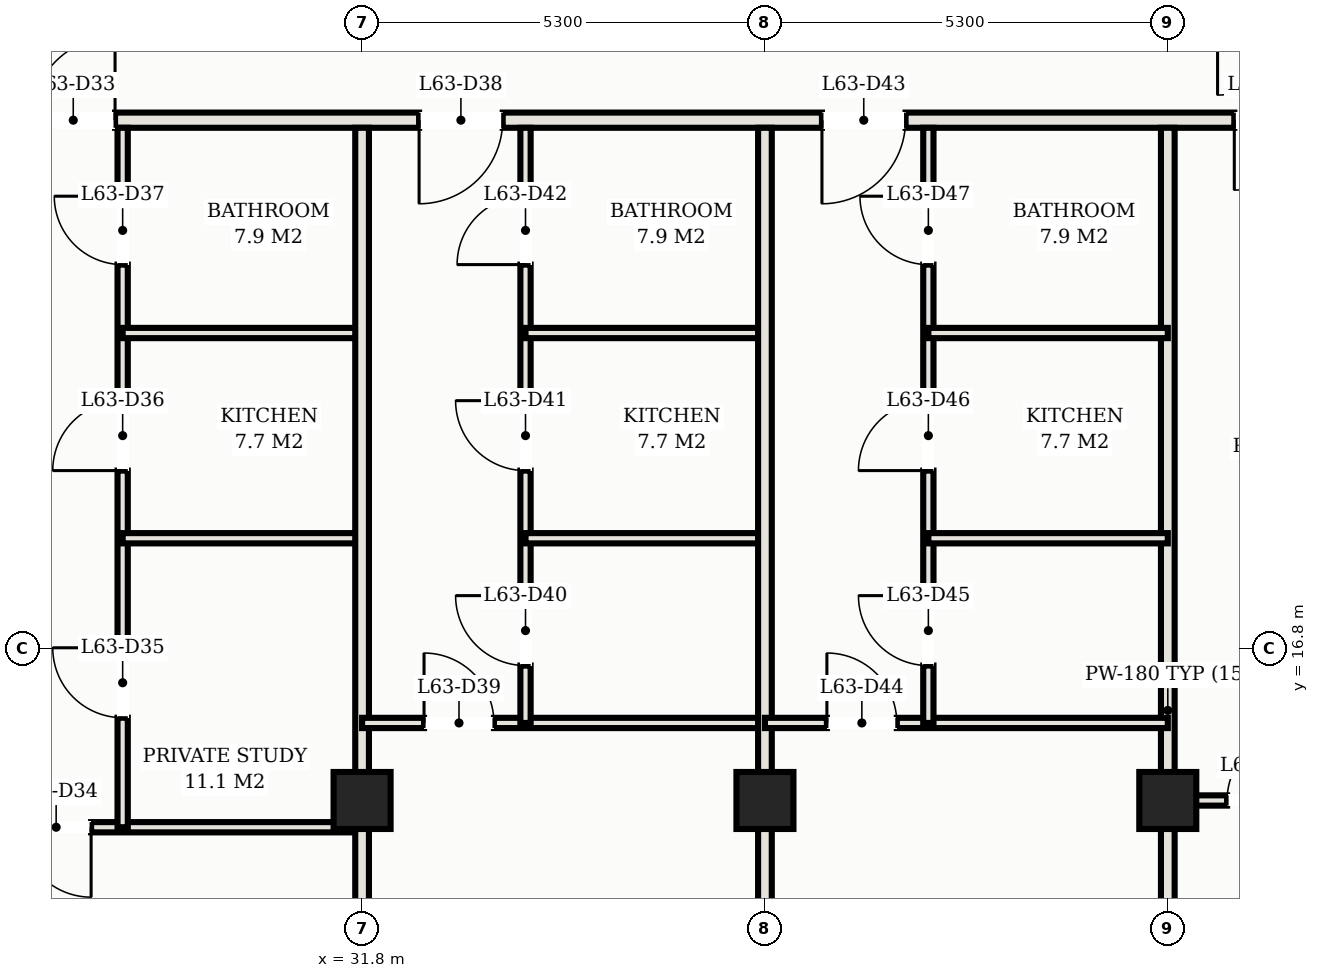
"""IFC4 building model, lengths in metres.
Left out: names, types, materials, properties, quantities, classifications, styles, units other than length and angle.
Written with IfcOpenShell. Run it as: python <this file> out.ifc"""

import sys

from ifc_helpers import new_model, si_unit, direction, frame, frame_2d, origin, origin_2d, place, context, subcontext, project, spatial, rectangle, hollow_rectangle, extrude, element, fill, save


model = new_model("IFC4")
c1 = context("Model", 3, precision=1e-05, world=origin(), true_north=direction((0.0, 1.0)))
c2 = subcontext(c1, "Body", "Model", "MODEL_VIEW")
j1 = project(units=[si_unit("LENGTHUNIT", "METRE"), si_unit("PLANEANGLEUNIT", "RADIAN")], contexts=[c1])
p1 = place(None, origin())
s1 = spatial("IfcSite", under=j1, at=p1, CompositionType="ELEMENT")
p2 = place(p1, origin())
s2 = spatial("IfcBuilding", under=s1, at=p2, CompositionType="ELEMENT")
p3 = place(p2, frame((0.0, 0.0, 229.7)))
s3 = spatial("IfcBuildingStorey", under=s2, at=p3, CompositionType="ELEMENT", Elevation=229.7)
for number, where, z_axis, x_axis in (
    (1, (31.8, 14.8, 0.0), (0.0, 0.0, 1.0), (1.0, 0.0, 0.0)),
    (2, (37.1, 14.8, 0.0), (0.0, 0.0, 1.0), (1.0, 0.0, 0.0)),
    (3, (42.4, 14.8, 0.0), (0.0, 0.0, 1.0), (1.0, 0.0, 0.0)),
):
    element("IfcColumn", number, at=place(p3, frame(where, z_axis=z_axis, x_axis=x_axis)), inside=s3, PredefinedType="COLUMN", context=c2, shape_type="SweptSolid", body=[
        extrude(hollow_rectangle(XDim=0.75, YDim=0.75, WallThickness=0.025, at=origin_2d()), origin(), (0.0, 0.0, 1.0), 3.3),
    ])
p4 = place(p3, frame((6.72, 23.75, 0.0), z_axis=(0.0, 0.0, 1.0), x_axis=(1.0, 0.0, 0.0)))
e4 = element("IfcWall", 4, at=p4, inside=s3, PredefinedType="PARTITIONING", context=c2, shape_type="SweptSolid", body=[
    extrude(rectangle(XDim=39.56, YDim=0.2, at=frame_2d((19.78, 0.0))), origin(), (0.0, 0.0, 1.0), 2.43),
])
p5 = place(p4, frame((4.63, 0.0, 0.0)))
e5 = element("IfcOpeningElement", 5, at=p5, cuts=e4, PredefinedType="OPENING", context=c2, shape_type="SweptSolid", body=[
    extrude(rectangle(XDim=1.1, YDim=2.25, at=frame_2d((0.55, 1.125))), frame((0.0, 0.11, 0.0), z_axis=(0.0, -1.0, 0.0), x_axis=(1.0, 0.0, 0.0)), (0.0, 0.0, 1.0), 0.22),
])
p6 = place(p4, frame((9.93, 0.0, 0.0)))
e6 = element("IfcOpeningElement", 6, at=p6, cuts=e4, PredefinedType="OPENING", context=c2, shape_type="SweptSolid", body=[
    extrude(rectangle(XDim=1.1, YDim=2.25, at=frame_2d((0.55, 1.125))), frame((0.0, 0.11, 0.0), z_axis=(0.0, -1.0, 0.0), x_axis=(1.0, 0.0, 0.0)), (0.0, 0.0, 1.0), 0.22),
])
p7 = place(p4, frame((15.23, 0.0, 0.0)))
e7 = element("IfcOpeningElement", 7, at=p7, cuts=e4, PredefinedType="OPENING", context=c2, shape_type="SweptSolid", body=[
    extrude(rectangle(XDim=1.1, YDim=2.25, at=frame_2d((0.55, 1.125))), frame((0.0, 0.11, 0.0), z_axis=(0.0, -1.0, 0.0), x_axis=(1.0, 0.0, 0.0)), (0.0, 0.0, 1.0), 0.22),
])
p8 = place(p4, frame((20.73, 0.0, 0.0)))
e8 = element("IfcOpeningElement", 8, at=p8, cuts=e4, PredefinedType="OPENING", context=c2, shape_type="SweptSolid", body=[
    extrude(rectangle(XDim=1.1, YDim=2.25, at=frame_2d((0.55, 1.125))), frame((0.0, 0.11, 0.0), z_axis=(0.0, -1.0, 0.0), x_axis=(1.0, 0.0, 0.0)), (0.0, 0.0, 1.0), 0.22),
])
p9 = place(p4, frame((25.83, 0.0, 0.0)))
e9 = element("IfcOpeningElement", 9, at=p9, cuts=e4, PredefinedType="OPENING", context=c2, shape_type="SweptSolid", body=[
    extrude(rectangle(XDim=1.1, YDim=2.25, at=frame_2d((0.55, 1.125))), frame((0.0, 0.11, 0.0), z_axis=(0.0, -1.0, 0.0), x_axis=(1.0, 0.0, 0.0)), (0.0, 0.0, 1.0), 0.22),
])
p10 = place(p4, frame((31.13, 0.0, 0.0)))
e10 = element("IfcOpeningElement", 10, at=p10, cuts=e4, PredefinedType="OPENING", context=c2, shape_type="SweptSolid", body=[
    extrude(rectangle(XDim=1.1, YDim=2.25, at=frame_2d((0.55, 1.125))), frame((0.0, 0.11, 0.0), z_axis=(0.0, -1.0, 0.0), x_axis=(1.0, 0.0, 0.0)), (0.0, 0.0, 1.0), 0.22),
])
p11 = place(p4, frame((2.085, 0.0, 0.0)))
e11 = element("IfcOpeningElement", 11, at=p11, cuts=e4, PredefinedType="OPENING", context=c2, shape_type="SweptSolid", body=[
    extrude(rectangle(XDim=0.92, YDim=2.15, at=frame_2d((0.46, 1.075))), frame((0.0, 0.11, 0.0), z_axis=(0.0, -1.0, 0.0), x_axis=(1.0, 0.0, 0.0)), (0.0, 0.0, 1.0), 0.22),
])
p12 = place(p4, frame((36.555, 0.0, 0.0)))
e12 = element("IfcOpeningElement", 12, at=p12, cuts=e4, PredefinedType="OPENING", context=c2, shape_type="SweptSolid", body=[
    extrude(rectangle(XDim=0.92, YDim=2.15, at=frame_2d((0.46, 1.075))), frame((0.0, 0.11, 0.0), z_axis=(0.0, -1.0, 0.0), x_axis=(1.0, 0.0, 0.0)), (0.0, 0.0, 1.0), 0.22),
])
p13 = place(p3, frame((42.4, 8.32, 0.0), z_axis=(0.0, 0.0, 1.0), x_axis=(0.0, 1.0, 0.0)))
e13 = element("IfcWall", 13, at=p13, inside=s3, PredefinedType="PARTITIONING", context=c2, shape_type="SweptSolid", body=[
    extrude(rectangle(XDim=15.33, YDim=0.18, at=frame_2d((7.665, 0.0))), origin(), (0.0, 0.0, 1.0), 2.43),
])
p14 = place(p3, frame((26.5, 14.448, 0.0), z_axis=(0.0, 0.0, 1.0), x_axis=(1.0, 0.0, 0.0)))
e14 = element("IfcWall", 14, at=p14, inside=s3, PredefinedType="PARTITIONING", context=c2, shape_type="SweptSolid", body=[
    extrude(rectangle(XDim=5.3, YDim=0.135, at=frame_2d((2.65, 0.0))), origin(), (0.0, 0.0, 1.0), 2.43),
])
p15 = place(p14, frame((0.815, 0.0, 0.0)))
e15 = element("IfcOpeningElement", 15, at=p15, cuts=e14, PredefinedType="OPENING", context=c2, shape_type="SweptSolid", body=[
    extrude(rectangle(XDim=0.92, YDim=2.15, at=frame_2d((0.46, 1.075))), frame((0.0, 0.078, 0.0), z_axis=(0.0, -1.0, 0.0), x_axis=(1.0, 0.0, 0.0)), (0.0, 0.0, 1.0), 0.155),
])
p16 = place(p3, frame((28.65, 14.448, 0.0), z_axis=(0.0, 0.0, 1.0), x_axis=(0.0, 1.0, 0.0)))
e16 = element("IfcWall", 16, at=p16, inside=s3, PredefinedType="PARTITIONING", context=c2, shape_type="SweptSolid", body=[
    extrude(rectangle(XDim=9.202, YDim=0.135, at=frame_2d((4.601, 0.0))), origin(), (0.0, 0.0, 1.0), 2.43),
])
p17 = place(p16, frame((1.441, 0.0, 0.0)))
e17 = element("IfcOpeningElement", 17, at=p17, cuts=e16, PredefinedType="OPENING", context=c2, shape_type="SweptSolid", body=[
    extrude(rectangle(XDim=0.92, YDim=2.15, at=frame_2d((0.46, 1.075))), frame((0.0, 0.078, 0.0), z_axis=(0.0, -1.0, 0.0), x_axis=(1.0, 0.0, 0.0)), (0.0, 0.0, 1.0), 0.155),
])
p18 = place(p16, frame((4.692, 0.0, 0.0)))
e18 = element("IfcOpeningElement", 18, at=p18, cuts=e16, PredefinedType="OPENING", context=c2, shape_type="SweptSolid", body=[
    extrude(rectangle(XDim=0.92, YDim=2.15, at=frame_2d((0.46, 1.075))), frame((0.0, 0.078, 0.0), z_axis=(0.0, -1.0, 0.0), x_axis=(1.0, 0.0, 0.0)), (0.0, 0.0, 1.0), 0.155),
])
p19 = place(p16, frame((7.402, 0.0, 0.0)))
e19 = element("IfcOpeningElement", 19, at=p19, cuts=e16, PredefinedType="OPENING", context=c2, shape_type="SweptSolid", body=[
    extrude(rectangle(XDim=0.9, YDim=2.15, at=frame_2d((0.45, 1.075))), frame((0.0, 0.078, 0.0), z_axis=(0.0, -1.0, 0.0), x_axis=(1.0, 0.0, 0.0)), (0.0, 0.0, 1.0), 0.155),
])
for number, where, z_axis, x_axis in (
    (20, (28.65, 18.25, 0.0), (0.0, 0.0, 1.0), (1.0, 0.0, 0.0)),
    (21, (28.65, 20.95, 0.0), (0.0, 0.0, 1.0), (1.0, 0.0, 0.0)),
):
    element("IfcWall", number, at=place(p3, frame(where, z_axis=z_axis, x_axis=x_axis)), inside=s3, PredefinedType="PARTITIONING", context=c2, shape_type="SweptSolid", body=[
        extrude(rectangle(XDim=3.15, YDim=0.135, at=frame_2d((1.575, 0.0))), origin(), (0.0, 0.0, 1.0), 2.43),
    ])
p20 = place(p3, frame((31.8, 5.331, 0.0), z_axis=(0.0, 0.0, 1.0), x_axis=(0.0, 1.0, 0.0)))
e22 = element("IfcWall", 22, at=p20, inside=s3, PredefinedType="PARTITIONING", context=c2, shape_type="SweptSolid", body=[
    extrude(rectangle(XDim=18.319, YDim=0.18, at=frame_2d((9.159, 0.0))), origin(), (0.0, 0.0, 1.0), 2.43),
])
p21 = place(p3, frame((31.8, 15.82, 0.0), z_axis=(0.0, 0.0, 1.0), x_axis=(1.0, 0.0, 0.0)))
e23 = element("IfcWall", 23, at=p21, inside=s3, PredefinedType="PARTITIONING", context=c2, shape_type="SweptSolid", body=[
    extrude(rectangle(XDim=5.3, YDim=0.135, at=frame_2d((2.65, 0.0))), origin(), (0.0, 0.0, 1.0), 2.43),
])
p22 = place(p21, frame((0.815, 0.0, 0.0)))
e24 = element("IfcOpeningElement", 24, at=p22, cuts=e23, PredefinedType="OPENING", context=c2, shape_type="SweptSolid", body=[
    extrude(rectangle(XDim=0.92, YDim=2.15, at=frame_2d((0.46, 1.075))), frame((0.0, 0.078, 0.0), z_axis=(0.0, -1.0, 0.0), x_axis=(1.0, 0.0, 0.0)), (0.0, 0.0, 1.0), 0.155),
])
p23 = place(p3, frame((33.95, 15.82, 0.0), z_axis=(0.0, 0.0, 1.0), x_axis=(0.0, 1.0, 0.0)))
e25 = element("IfcWall", 25, at=p23, inside=s3, PredefinedType="PARTITIONING", context=c2, shape_type="SweptSolid", body=[
    extrude(rectangle(XDim=7.83, YDim=0.135, at=frame_2d((3.915, 0.0))), origin(), (0.0, 0.0, 1.0), 2.43),
])
p24 = place(p23, frame((0.755, 0.0, 0.0)))
e26 = element("IfcOpeningElement", 26, at=p24, cuts=e25, PredefinedType="OPENING", context=c2, shape_type="SweptSolid", body=[
    extrude(rectangle(XDim=0.92, YDim=2.15, at=frame_2d((0.46, 1.075))), frame((0.0, 0.078, 0.0), z_axis=(0.0, -1.0, 0.0), x_axis=(1.0, 0.0, 0.0)), (0.0, 0.0, 1.0), 0.155),
])
p25 = place(p23, frame((3.32, 0.0, 0.0)))
e27 = element("IfcOpeningElement", 27, at=p25, cuts=e25, PredefinedType="OPENING", context=c2, shape_type="SweptSolid", body=[
    extrude(rectangle(XDim=0.92, YDim=2.15, at=frame_2d((0.46, 1.075))), frame((0.0, 0.078, 0.0), z_axis=(0.0, -1.0, 0.0), x_axis=(1.0, 0.0, 0.0)), (0.0, 0.0, 1.0), 0.155),
])
p26 = place(p23, frame((6.03, 0.0, 0.0)))
e28 = element("IfcOpeningElement", 28, at=p26, cuts=e25, PredefinedType="OPENING", context=c2, shape_type="SweptSolid", body=[
    extrude(rectangle(XDim=0.9, YDim=2.15, at=frame_2d((0.45, 1.075))), frame((0.0, 0.078, 0.0), z_axis=(0.0, -1.0, 0.0), x_axis=(1.0, 0.0, 0.0)), (0.0, 0.0, 1.0), 0.155),
])
for number, where, z_axis, x_axis in (
    (29, (33.95, 18.25, 0.0), (0.0, 0.0, 1.0), (1.0, 0.0, 0.0)),
    (30, (33.95, 20.95, 0.0), (0.0, 0.0, 1.0), (1.0, 0.0, 0.0)),
):
    element("IfcWall", number, at=place(p3, frame(where, z_axis=z_axis, x_axis=x_axis)), inside=s3, PredefinedType="PARTITIONING", context=c2, shape_type="SweptSolid", body=[
        extrude(rectangle(XDim=3.15, YDim=0.135, at=frame_2d((1.575, 0.0))), origin(), (0.0, 0.0, 1.0), 2.43),
    ])
p27 = place(p3, frame((37.1, 6.02, 0.0), z_axis=(0.0, 0.0, 1.0), x_axis=(0.0, 1.0, 0.0)))
e31 = element("IfcWall", 31, at=p27, inside=s3, PredefinedType="PARTITIONING", context=c2, shape_type="SweptSolid", body=[
    extrude(rectangle(XDim=17.63, YDim=0.18, at=frame_2d((8.815, 0.0))), origin(), (0.0, 0.0, 1.0), 2.43),
])
p28 = place(p3, frame((37.1, 15.82, 0.0), z_axis=(0.0, 0.0, 1.0), x_axis=(1.0, 0.0, 0.0)))
e32 = element("IfcWall", 32, at=p28, inside=s3, PredefinedType="PARTITIONING", context=c2, shape_type="SweptSolid", body=[
    extrude(rectangle(XDim=5.3, YDim=0.135, at=frame_2d((2.65, 0.0))), origin(), (0.0, 0.0, 1.0), 2.43),
])
p29 = place(p28, frame((0.815, 0.0, 0.0)))
e33 = element("IfcOpeningElement", 33, at=p29, cuts=e32, PredefinedType="OPENING", context=c2, shape_type="SweptSolid", body=[
    extrude(rectangle(XDim=0.92, YDim=2.15, at=frame_2d((0.46, 1.075))), frame((0.0, 0.078, 0.0), z_axis=(0.0, -1.0, 0.0), x_axis=(1.0, 0.0, 0.0)), (0.0, 0.0, 1.0), 0.155),
])
p30 = place(p3, frame((39.25, 15.82, 0.0), z_axis=(0.0, 0.0, 1.0), x_axis=(0.0, 1.0, 0.0)))
e34 = element("IfcWall", 34, at=p30, inside=s3, PredefinedType="PARTITIONING", context=c2, shape_type="SweptSolid", body=[
    extrude(rectangle(XDim=7.83, YDim=0.135, at=frame_2d((3.915, 0.0))), origin(), (0.0, 0.0, 1.0), 2.43),
])
p31 = place(p30, frame((0.755, 0.0, 0.0)))
e35 = element("IfcOpeningElement", 35, at=p31, cuts=e34, PredefinedType="OPENING", context=c2, shape_type="SweptSolid", body=[
    extrude(rectangle(XDim=0.92, YDim=2.15, at=frame_2d((0.46, 1.075))), frame((0.0, 0.078, 0.0), z_axis=(0.0, -1.0, 0.0), x_axis=(1.0, 0.0, 0.0)), (0.0, 0.0, 1.0), 0.155),
])
p32 = place(p30, frame((3.32, 0.0, 0.0)))
e36 = element("IfcOpeningElement", 36, at=p32, cuts=e34, PredefinedType="OPENING", context=c2, shape_type="SweptSolid", body=[
    extrude(rectangle(XDim=0.92, YDim=2.15, at=frame_2d((0.46, 1.075))), frame((0.0, 0.078, 0.0), z_axis=(0.0, -1.0, 0.0), x_axis=(1.0, 0.0, 0.0)), (0.0, 0.0, 1.0), 0.155),
])
p33 = place(p30, frame((6.03, 0.0, 0.0)))
e37 = element("IfcOpeningElement", 37, at=p33, cuts=e34, PredefinedType="OPENING", context=c2, shape_type="SweptSolid", body=[
    extrude(rectangle(XDim=0.9, YDim=2.15, at=frame_2d((0.45, 1.075))), frame((0.0, 0.078, 0.0), z_axis=(0.0, -1.0, 0.0), x_axis=(1.0, 0.0, 0.0)), (0.0, 0.0, 1.0), 0.155),
])
for number, where, z_axis, x_axis in (
    (38, (39.25, 18.25, 0.0), (0.0, 0.0, 1.0), (1.0, 0.0, 0.0)),
    (39, (39.25, 20.95, 0.0), (0.0, 0.0, 1.0), (1.0, 0.0, 0.0)),
):
    element("IfcWall", number, at=place(p3, frame(where, z_axis=z_axis, x_axis=x_axis)), inside=s3, PredefinedType="PARTITIONING", context=c2, shape_type="SweptSolid", body=[
        extrude(rectangle(XDim=3.15, YDim=0.135, at=frame_2d((1.575, 0.0))), origin(), (0.0, 0.0, 1.0), 2.43),
    ])
p34 = place(p3, frame((42.4, 14.8, 0.0), z_axis=(0.0, 0.0, 1.0), x_axis=(1.0, 0.0, 0.0)))
e40 = element("IfcWall", 40, at=p34, inside=s3, PredefinedType="PARTITIONING", context=c2, shape_type="SweptSolid", body=[
    extrude(rectangle(XDim=3.78, YDim=0.135, at=frame_2d((1.89, 0.0))), origin(), (0.0, 0.0, 1.0), 2.43),
])
p35 = place(p34, frame((0.78, 0.0, 0.0)))
e41 = element("IfcOpeningElement", 41, at=p35, cuts=e40, PredefinedType="OPENING", context=c2, shape_type="SweptSolid", body=[
    extrude(rectangle(XDim=0.92, YDim=2.15, at=frame_2d((0.46, 1.075))), frame((0.0, 0.078, 0.0), z_axis=(0.0, -1.0, 0.0), x_axis=(1.0, 0.0, 0.0)), (0.0, 0.0, 1.0), 0.155),
])
p36 = place(p8, origin())
e42 = element("IfcDoor", 42, at=p36, inside=s3, OperationType="SINGLE_SWING_RIGHT", PredefinedType="DOOR", context=c2, shape_type="SweptSolid", body=[
    extrude(rectangle(XDim=1.1, YDim=2.25, at=frame_2d((0.55, 1.125))), frame((0.0, 0.025, 0.0), z_axis=(0.0, -1.0, 0.0), x_axis=(1.0, 0.0, 0.0)), (0.0, 0.0, 1.0), 0.05),
])
fill(e8, e42)
p37 = place(p15, frame((0.92, 0.0, 0.0), z_axis=(0.0, 0.0, 1.0), x_axis=(-1.0, 0.0, 0.0)))
e43 = element("IfcDoor", 43, at=p37, inside=s3, OperationType="SINGLE_SWING_LEFT", PredefinedType="DOOR", context=c2, shape_type="SweptSolid", body=[
    extrude(rectangle(XDim=0.92, YDim=2.15, at=frame_2d((0.46, 1.075))), frame((0.0, 0.025, 0.0), z_axis=(0.0, -1.0, 0.0), x_axis=(1.0, 0.0, 0.0)), (0.0, 0.0, 1.0), 0.05),
])
fill(e15, e43)
p38 = place(p17, origin())
e44 = element("IfcDoor", 44, at=p38, inside=s3, OperationType="SINGLE_SWING_RIGHT", PredefinedType="DOOR", context=c2, shape_type="SweptSolid", body=[
    extrude(rectangle(XDim=0.92, YDim=2.15, at=frame_2d((0.46, 1.075))), frame((0.0, 0.025, 0.0), z_axis=(0.0, -1.0, 0.0), x_axis=(1.0, 0.0, 0.0)), (0.0, 0.0, 1.0), 0.05),
])
fill(e17, e44)
p39 = place(p18, origin())
e45 = element("IfcDoor", 45, at=p39, inside=s3, OperationType="SINGLE_SWING_LEFT", PredefinedType="DOOR", context=c2, shape_type="SweptSolid", body=[
    extrude(rectangle(XDim=0.92, YDim=2.15, at=frame_2d((0.46, 1.075))), frame((0.0, 0.025, 0.0), z_axis=(0.0, -1.0, 0.0), x_axis=(1.0, 0.0, 0.0)), (0.0, 0.0, 1.0), 0.05),
])
fill(e18, e45)
p40 = place(p19, origin())
e46 = element("IfcDoor", 46, at=p40, inside=s3, OperationType="SINGLE_SWING_RIGHT", PredefinedType="DOOR", context=c2, shape_type="SweptSolid", body=[
    extrude(rectangle(XDim=0.9, YDim=2.15, at=frame_2d((0.45, 1.075))), frame((0.0, 0.025, 0.0), z_axis=(0.0, -1.0, 0.0), x_axis=(1.0, 0.0, 0.0)), (0.0, 0.0, 1.0), 0.05),
])
fill(e19, e46)
p41 = place(p9, frame((1.1, 0.0, 0.0), z_axis=(0.0, 0.0, 1.0), x_axis=(-1.0, 0.0, 0.0)))
e47 = element("IfcDoor", 47, at=p41, inside=s3, OperationType="SINGLE_SWING_RIGHT", PredefinedType="DOOR", context=c2, shape_type="SweptSolid", body=[
    extrude(rectangle(XDim=1.1, YDim=2.25, at=frame_2d((0.55, 1.125))), frame((0.0, 0.025, 0.0), z_axis=(0.0, -1.0, 0.0), x_axis=(1.0, 0.0, 0.0)), (0.0, 0.0, 1.0), 0.05),
])
fill(e9, e47)
p42 = place(p22, origin())
e48 = element("IfcDoor", 48, at=p42, inside=s3, OperationType="SINGLE_SWING_LEFT", PredefinedType="DOOR", context=c2, shape_type="SweptSolid", body=[
    extrude(rectangle(XDim=0.92, YDim=2.15, at=frame_2d((0.46, 1.075))), frame((0.0, 0.025, 0.0), z_axis=(0.0, -1.0, 0.0), x_axis=(1.0, 0.0, 0.0)), (0.0, 0.0, 1.0), 0.05),
])
fill(e24, e48)
p43 = place(p24, origin())
e49 = element("IfcDoor", 49, at=p43, inside=s3, OperationType="SINGLE_SWING_RIGHT", PredefinedType="DOOR", context=c2, shape_type="SweptSolid", body=[
    extrude(rectangle(XDim=0.92, YDim=2.15, at=frame_2d((0.46, 1.075))), frame((0.0, 0.025, 0.0), z_axis=(0.0, -1.0, 0.0), x_axis=(1.0, 0.0, 0.0)), (0.0, 0.0, 1.0), 0.05),
])
fill(e26, e49)
p44 = place(p25, origin())
e50 = element("IfcDoor", 50, at=p44, inside=s3, OperationType="SINGLE_SWING_RIGHT", PredefinedType="DOOR", context=c2, shape_type="SweptSolid", body=[
    extrude(rectangle(XDim=0.92, YDim=2.15, at=frame_2d((0.46, 1.075))), frame((0.0, 0.025, 0.0), z_axis=(0.0, -1.0, 0.0), x_axis=(1.0, 0.0, 0.0)), (0.0, 0.0, 1.0), 0.05),
])
fill(e27, e50)
p45 = place(p26, origin())
e51 = element("IfcDoor", 51, at=p45, inside=s3, OperationType="SINGLE_SWING_LEFT", PredefinedType="DOOR", context=c2, shape_type="SweptSolid", body=[
    extrude(rectangle(XDim=0.9, YDim=2.15, at=frame_2d((0.45, 1.075))), frame((0.0, 0.025, 0.0), z_axis=(0.0, -1.0, 0.0), x_axis=(1.0, 0.0, 0.0)), (0.0, 0.0, 1.0), 0.05),
])
fill(e28, e51)
p46 = place(p10, frame((1.1, 0.0, 0.0), z_axis=(0.0, 0.0, 1.0), x_axis=(-1.0, 0.0, 0.0)))
e52 = element("IfcDoor", 52, at=p46, inside=s3, OperationType="SINGLE_SWING_RIGHT", PredefinedType="DOOR", context=c2, shape_type="SweptSolid", body=[
    extrude(rectangle(XDim=1.1, YDim=2.25, at=frame_2d((0.55, 1.125))), frame((0.0, 0.025, 0.0), z_axis=(0.0, -1.0, 0.0), x_axis=(1.0, 0.0, 0.0)), (0.0, 0.0, 1.0), 0.05),
])
fill(e10, e52)
p47 = place(p29, origin())
e53 = element("IfcDoor", 53, at=p47, inside=s3, OperationType="SINGLE_SWING_LEFT", PredefinedType="DOOR", context=c2, shape_type="SweptSolid", body=[
    extrude(rectangle(XDim=0.92, YDim=2.15, at=frame_2d((0.46, 1.075))), frame((0.0, 0.025, 0.0), z_axis=(0.0, -1.0, 0.0), x_axis=(1.0, 0.0, 0.0)), (0.0, 0.0, 1.0), 0.05),
])
fill(e33, e53)
p48 = place(p31, origin())
e54 = element("IfcDoor", 54, at=p48, inside=s3, OperationType="SINGLE_SWING_RIGHT", PredefinedType="DOOR", context=c2, shape_type="SweptSolid", body=[
    extrude(rectangle(XDim=0.92, YDim=2.15, at=frame_2d((0.46, 1.075))), frame((0.0, 0.025, 0.0), z_axis=(0.0, -1.0, 0.0), x_axis=(1.0, 0.0, 0.0)), (0.0, 0.0, 1.0), 0.05),
])
fill(e35, e54)
p49 = place(p32, origin())
e55 = element("IfcDoor", 55, at=p49, inside=s3, OperationType="SINGLE_SWING_LEFT", PredefinedType="DOOR", context=c2, shape_type="SweptSolid", body=[
    extrude(rectangle(XDim=0.92, YDim=2.15, at=frame_2d((0.46, 1.075))), frame((0.0, 0.025, 0.0), z_axis=(0.0, -1.0, 0.0), x_axis=(1.0, 0.0, 0.0)), (0.0, 0.0, 1.0), 0.05),
])
fill(e36, e55)
p50 = place(p33, origin())
e56 = element("IfcDoor", 56, at=p50, inside=s3, OperationType="SINGLE_SWING_RIGHT", PredefinedType="DOOR", context=c2, shape_type="SweptSolid", body=[
    extrude(rectangle(XDim=0.9, YDim=2.15, at=frame_2d((0.45, 1.075))), frame((0.0, 0.025, 0.0), z_axis=(0.0, -1.0, 0.0), x_axis=(1.0, 0.0, 0.0)), (0.0, 0.0, 1.0), 0.05),
])
fill(e37, e56)
p51 = place(p35, origin())
e57 = element("IfcDoor", 57, at=p51, inside=s3, OperationType="SINGLE_SWING_RIGHT", PredefinedType="DOOR", context=c2, shape_type="SweptSolid", body=[
    extrude(rectangle(XDim=0.92, YDim=2.15, at=frame_2d((0.46, 1.075))), frame((0.0, 0.025, 0.0), z_axis=(0.0, -1.0, 0.0), x_axis=(1.0, 0.0, 0.0)), (0.0, 0.0, 1.0), 0.05),
])
fill(e41, e57)
p52 = place(p12, frame((0.92, 0.0, 0.0), z_axis=(0.0, 0.0, 1.0), x_axis=(-1.0, 0.0, 0.0)))
e58 = element("IfcDoor", 58, at=p52, inside=s3, OperationType="SINGLE_SWING_RIGHT", PredefinedType="DOOR", context=c2, shape_type="SweptSolid", body=[
    extrude(rectangle(XDim=0.92, YDim=2.15, at=frame_2d((0.46, 1.075))), frame((0.0, 0.025, 0.0), z_axis=(0.0, -1.0, 0.0), x_axis=(1.0, 0.0, 0.0)), (0.0, 0.0, 1.0), 0.05),
])
fill(e12, e58)
save(model, sys.argv[1])
